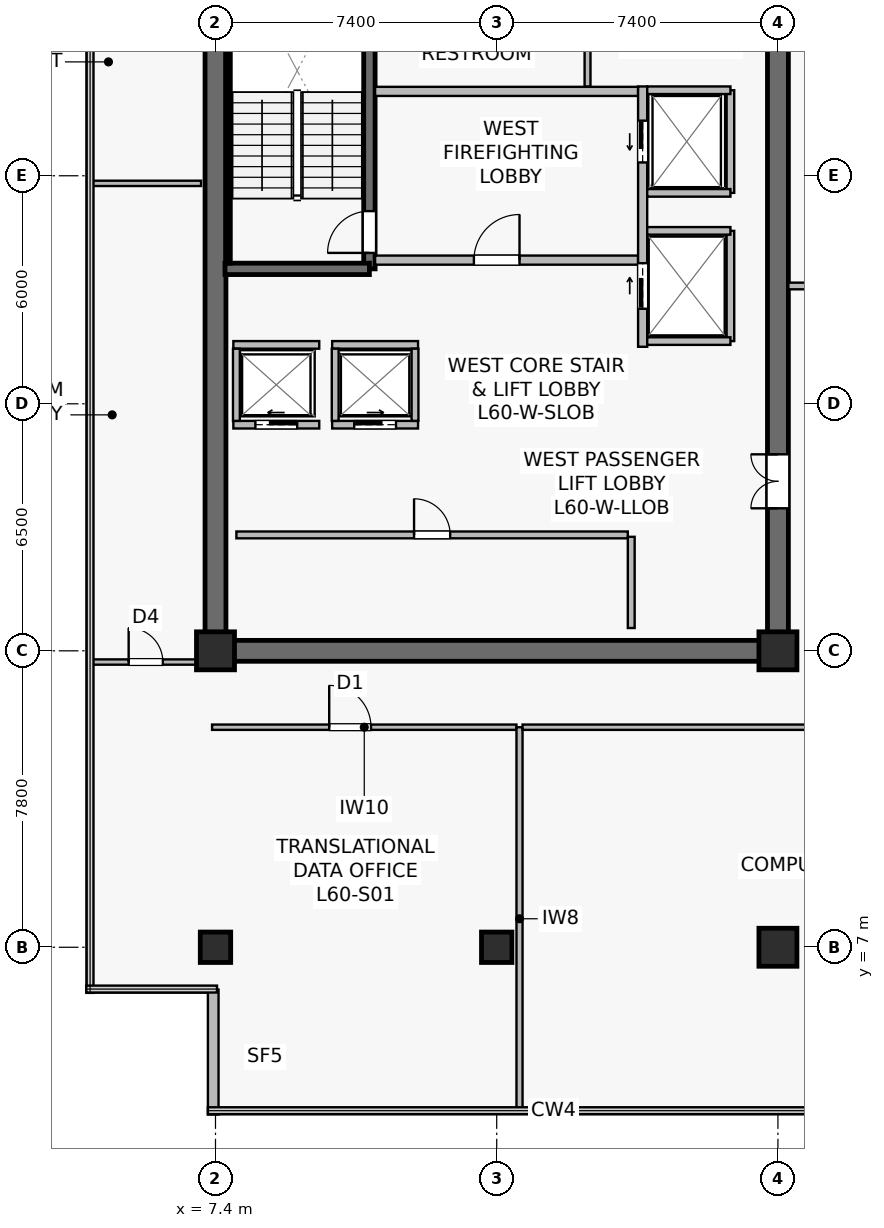
"""IFC4 building model, lengths in metres.
Left out: names, types, materials, properties, quantities, classifications, styles, units other than length and angle.
Written with IfcOpenShell. Run it as: python <this file> out.ifc"""

import sys

from ifc_helpers import new_model, si_unit, direction, frame, frame_2d, origin, origin_2d, place, context, subcontext, project, spatial, rectangle, extrude, source, transform, mapped, element, fill, save


model = new_model("IFC4")
c1 = context("Model", 3, precision=1e-05, world=origin(), true_north=direction((0.0, 1.0)))
c2 = subcontext(c1, "Body", "Model", "MODEL_VIEW")
j1 = project(units=[si_unit("LENGTHUNIT", "METRE"), si_unit("PLANEANGLEUNIT", "RADIAN")], contexts=[c1])
p1 = place(None, origin())
s1 = spatial("IfcSite", under=j1, at=p1, CompositionType="ELEMENT")
p2 = place(p1, origin())
s2 = spatial("IfcBuilding", under=s1, at=p2, CompositionType="ELEMENT")
p3 = place(p2, frame((0.0, 0.0, 250.6)))
s3 = spatial("IfcBuildingStorey", under=s2, at=p3, CompositionType="ELEMENT", Elevation=250.6)
p4 = place(p3, frame((7.125, 14.8, 0.0), z_axis=(0.0, 0.0, 1.0), x_axis=(1.0, 0.0, 0.0)))
e1 = element("IfcWall", 1, at=p4, inside=s3, PredefinedType="SHEAR", context=c2, shape_type="SweptSolid", body=[
    extrude(rectangle(XDim=15.35, YDim=0.55, at=frame_2d((7.675, 0.0))), origin(), (0.0, 0.0, 1.0), 3.8),
])
p5 = place(p3, frame((7.4, 15.075, 0.0), z_axis=(0.0, 0.0, 1.0), x_axis=(0.0, 1.0, 0.0)))
e2 = element("IfcWall", 2, at=p5, inside=s3, PredefinedType="SHEAR", context=c2, shape_type="SweptSolid", body=[
    extrude(rectangle(XDim=18.45, YDim=0.55, at=frame_2d((9.225, 0.0))), origin(), (0.0, 0.0, 1.0), 3.8),
])
p6 = place(p3, frame((22.2, 15.075, 0.0), z_axis=(0.0, 0.0, 1.0), x_axis=(0.0, 1.0, 0.0)))
e3 = element("IfcWall", 3, at=p6, inside=s3, PredefinedType="SHEAR", context=c2, shape_type="SweptSolid", body=[
    extrude(rectangle(XDim=18.45, YDim=0.55, at=frame_2d((9.225, 0.0))), origin(), (0.0, 0.0, 1.0), 3.8),
])
p7 = place(p6, frame((3.475, 0.0, 0.0)))
e4 = element("IfcOpeningElement", 4, at=p7, cuts=e3, PredefinedType="OPENING", context=c2, shape_type="SweptSolid", body=[
    extrude(rectangle(XDim=1.42, YDim=2.2, at=frame_2d((0.71, 1.1))), frame((0.0, 0.285, 0.0), z_axis=(0.0, -1.0, 0.0), x_axis=(1.0, 0.0, 0.0)), (0.0, 0.0, 1.0), 0.57),
])
p8 = place(p3, frame((11.45, 24.85, 0.0), z_axis=(0.0, 0.0, 1.0), x_axis=(0.0, 1.0, 0.0)))
e5 = element("IfcWall", 5, at=p8, inside=s3, PredefinedType="SHEAR", context=c2, shape_type="SweptSolid", body=[
    extrude(rectangle(XDim=8.63, YDim=0.3, at=frame_2d((4.315, 0.0))), origin(), (0.0, 0.0, 1.0), 3.8),
])
p9 = place(p8, frame((0.42, 0.0, 0.0)))
e6 = element("IfcOpeningElement", 6, at=p9, cuts=e5, PredefinedType="OPENING", context=c2, shape_type="SweptSolid", body=[
    extrude(rectangle(XDim=1.1, YDim=2.15, at=frame_2d((0.55, 1.075))), frame((0.0, 0.16, 0.0), z_axis=(0.0, -1.0, 0.0), x_axis=(1.0, 0.0, 0.0)), (0.0, 0.0, 1.0), 0.32),
])
p10 = place(p3, frame((7.65, 24.85, 0.0), z_axis=(0.0, 0.0, 1.0), x_axis=(1.0, 0.0, 0.0)))
e7 = element("IfcWall", 7, at=p10, inside=s3, PredefinedType="SHEAR", context=c2, shape_type="SweptSolid", body=[
    extrude(rectangle(XDim=3.8, YDim=0.3, at=frame_2d((1.9, 0.0))), origin(), (0.0, 0.0, 1.0), 3.8),
])
p11 = place(p3, frame((7.73, 25.0, 0.0), z_axis=(0.0, 0.0, 1.0), x_axis=(0.0, 1.0, 0.0)))
e8 = element("IfcWall", 8, at=p11, inside=s3, PredefinedType="SOLIDWALL", context=c2, shape_type="SweptSolid", body=[
    extrude(rectangle(XDim=8.32, YDim=0.12, at=frame_2d((4.16, 0.0))), origin(), (0.0, 0.0, 1.0), 3.8),
])
m1 = source(origin(), c2, "Body", "SweptSolid", [
    extrude(rectangle(XDim=0.8, YDim=0.8, at=origin_2d()), origin(), (0.0, 0.0, 1.0), 4.1),
])
p12 = place(p3, frame((14.8, 7.0, 0.0), z_axis=(0.0, 0.0, 1.0), x_axis=(1.0, 0.0, 0.0)))
e9 = element("IfcColumn", 9, at=p12, inside=s3, PredefinedType="COLUMN", context=c2, shape_type="MappedRepresentation", body=[
    mapped(m1, transform((0.0, 0.0, 0.0), scale=1.0)),
])
m2 = source(origin(), c2, "Body", "SweptSolid", [
    extrude(rectangle(XDim=1.0, YDim=1.0, at=origin_2d()), origin(), (0.0, 0.0, 1.0), 4.1),
])
for number, where, z_axis, x_axis in (
    (10, (22.2, 7.0, 0.0), (0.0, 0.0, 1.0), (1.0, 0.0, 0.0)),
    (11, (7.4, 14.8, 0.0), (0.0, 0.0, 1.0), (1.0, 0.0, 0.0)),
    (12, (22.2, 14.8, 0.0), (0.0, 0.0, 1.0), (1.0, 0.0, 0.0)),
):
    element("IfcColumn", number, at=place(p3, frame(where, z_axis=z_axis, x_axis=x_axis)), inside=s3, PredefinedType="COLUMN", context=c2, shape_type="MappedRepresentation", body=[
        mapped(m2, transform((0.0, 0.0, 0.0), scale=1.0)),
    ])
p13 = place(p3, frame((7.4, 7.0, 0.0), z_axis=(0.0, 0.0, 1.0), x_axis=(1.0, 0.0, 0.0)))
e13 = element("IfcColumn", 13, at=p13, inside=s3, PredefinedType="COLUMN", context=c2, shape_type="MappedRepresentation", body=[
    mapped(m1, transform((0.0, 0.0, 0.0), scale=1.0)),
])
p14 = place(p3, frame((7.34, 5.888, 0.0), z_axis=(0.0, 0.0, 1.0), x_axis=(0.0, -1.0, 0.0)))
e14 = element("IfcWall", 14, at=p14, inside=s3, PredefinedType="STANDARD", context=c2, shape_type="SweptSolid", body=[
    extrude(rectangle(XDim=3.288, YDim=0.28, at=frame_2d((1.644, 0.0))), origin(), (0.0, 0.0, 1.0), 3.8),
])
p15 = place(p3, frame((11.6, 25.08, 0.0), z_axis=(0.0, 0.0, 1.0), x_axis=(1.0, 0.0, 0.0)))
e15 = element("IfcWall", 15, at=p15, inside=s3, PredefinedType="SOLIDWALL", context=c2, shape_type="SweptSolid", body=[
    extrude(rectangle(XDim=6.92, YDim=0.24, at=frame_2d((3.46, 0.0))), origin(), (0.0, 0.0, 1.0), 3.197),
])
p16 = place(p15, frame((2.6, 0.0, 0.0)))
e16 = element("IfcOpeningElement", 16, at=p16, cuts=e15, PredefinedType="OPENING", context=c2, shape_type="SweptSolid", body=[
    extrude(rectangle(XDim=1.2, YDim=2.16, at=frame_2d((0.6, 1.08))), frame((0.0, 0.13, 0.0), z_axis=(0.0, -1.0, 0.0), x_axis=(1.0, 0.0, 0.0)), (0.0, 0.0, 1.0), 0.26),
])
p17 = place(p3, frame((11.6, 29.52, 0.0), z_axis=(0.0, 0.0, 1.0), x_axis=(1.0, 0.0, 0.0)))
e17 = element("IfcWall", 17, at=p17, inside=s3, PredefinedType="SOLIDWALL", context=c2, shape_type="SweptSolid", body=[
    extrude(rectangle(XDim=6.92, YDim=0.24, at=frame_2d((3.46, 0.0))), origin(), (0.0, 0.0, 1.0), 3.197),
])
p18 = place(p3, frame((18.64, 22.8, 0.0), z_axis=(0.0, 0.0, 1.0), x_axis=(0.0, 1.0, 0.0)))
e18 = element("IfcWall", 18, at=p18, inside=s3, PredefinedType="SOLIDWALL", context=c2, shape_type="SweptSolid", body=[
    extrude(rectangle(XDim=6.85, YDim=0.24, at=frame_2d((3.425, 0.0))), origin(), (0.0, 0.0, 1.0), 2.935),
])
p19 = place(p18, frame((4.85, 0.0, 0.0)))
e19 = element("IfcOpeningElement", 19, at=p19, cuts=e18, PredefinedType="OPENING", context=c2, shape_type="SweptSolid", body=[
    extrude(rectangle(XDim=1.1, YDim=2.22, at=frame_2d((0.55, 1.11))), frame((0.0, 0.13, 0.0), z_axis=(0.0, -1.0, 0.0), x_axis=(1.0, 0.0, 0.0)), (0.0, 0.0, 1.0), 0.26),
])
p20 = place(p18, frame((1.0, 0.0, 0.0)))
e20 = element("IfcOpeningElement", 20, at=p20, cuts=e18, PredefinedType="OPENING", context=c2, shape_type="SweptSolid", body=[
    extrude(rectangle(XDim=1.2, YDim=2.22, at=frame_2d((0.6, 1.11))), frame((0.0, 0.13, 0.0), z_axis=(0.0, -1.0, 0.0), x_axis=(1.0, 0.0, 0.0)), (0.0, 0.0, 1.0), 0.26),
])
p21 = place(p3, frame((7.87, 20.75, 0.0), z_axis=(0.0, 0.0, 1.0), x_axis=(1.0, 0.0, 0.0)))
e21 = element("IfcWall", 21, at=p21, inside=s3, PredefinedType="SOLIDWALL", context=c2, shape_type="SweptSolid", body=[
    extrude(rectangle(XDim=2.26, YDim=0.2, at=frame_2d((1.13, 0.0))), origin(), (0.0, 0.0, 1.0), 3.8),
])
p22 = place(p21, frame((0.58, 0.0, 0.0)))
e22 = element("IfcOpeningElement", 22, at=p22, cuts=e21, PredefinedType="OPENING", context=c2, shape_type="SweptSolid", body=[
    extrude(rectangle(XDim=1.1, YDim=2.22, at=frame_2d((0.55, 1.11))), frame((0.0, 0.11, 0.0), z_axis=(0.0, -1.0, 0.0), x_axis=(1.0, 0.0, 0.0)), (0.0, 0.0, 1.0), 0.22),
])
p23 = place(p3, frame((7.87, 22.85, 0.0), z_axis=(0.0, 0.0, 1.0), x_axis=(1.0, 0.0, 0.0)))
e23 = element("IfcWall", 23, at=p23, inside=s3, PredefinedType="SOLIDWALL", context=c2, shape_type="SweptSolid", body=[
    extrude(rectangle(XDim=2.26, YDim=0.2, at=frame_2d((1.13, 0.0))), origin(), (0.0, 0.0, 1.0), 3.8),
])
p24 = place(p3, frame((7.95, 20.85, 0.0), z_axis=(0.0, 0.0, 1.0), x_axis=(0.0, 1.0, 0.0)))
e24 = element("IfcWall", 24, at=p24, inside=s3, PredefinedType="SOLIDWALL", context=c2, shape_type="SweptSolid", body=[
    extrude(rectangle(XDim=1.9, YDim=0.18, at=frame_2d((0.95, 0.0))), origin(), (0.0, 0.0, 1.0), 3.8),
])
p25 = place(p3, frame((10.47, 20.75, 0.0), z_axis=(0.0, 0.0, 1.0), x_axis=(1.0, 0.0, 0.0)))
e25 = element("IfcWall", 25, at=p25, inside=s3, PredefinedType="SOLIDWALL", context=c2, shape_type="SweptSolid", body=[
    extrude(rectangle(XDim=2.26, YDim=0.2, at=frame_2d((1.13, 0.0))), origin(), (0.0, 0.0, 1.0), 3.8),
])
p26 = place(p25, frame((0.58, 0.0, 0.0)))
e26 = element("IfcOpeningElement", 26, at=p26, cuts=e25, PredefinedType="OPENING", context=c2, shape_type="SweptSolid", body=[
    extrude(rectangle(XDim=1.1, YDim=2.22, at=frame_2d((0.55, 1.11))), frame((0.0, 0.11, 0.0), z_axis=(0.0, -1.0, 0.0), x_axis=(1.0, 0.0, 0.0)), (0.0, 0.0, 1.0), 0.22),
])
p27 = place(p3, frame((10.47, 22.85, 0.0), z_axis=(0.0, 0.0, 1.0), x_axis=(1.0, 0.0, 0.0)))
e27 = element("IfcWall", 27, at=p27, inside=s3, PredefinedType="SOLIDWALL", context=c2, shape_type="SweptSolid", body=[
    extrude(rectangle(XDim=2.26, YDim=0.2, at=frame_2d((1.13, 0.0))), origin(), (0.0, 0.0, 1.0), 3.8),
])
for number, where, z_axis, x_axis in (
    (28, (10.55, 20.85, 0.0), (0.0, 0.0, 1.0), (0.0, 1.0, 0.0)),
    (29, (12.65, 20.85, 0.0), (0.0, 0.0, 1.0), (0.0, 1.0, 0.0)),
):
    element("IfcWall", number, at=place(p3, frame(where, z_axis=z_axis, x_axis=x_axis)), inside=s3, PredefinedType="SOLIDWALL", context=c2, shape_type="SweptSolid", body=[
        extrude(rectangle(XDim=1.9, YDim=0.18, at=frame_2d((0.95, 0.0))), origin(), (0.0, 0.0, 1.0), 3.8),
    ])
p28 = place(p3, frame((20.95, 26.85, 0.0), z_axis=(0.0, 0.0, 1.0), x_axis=(0.0, 1.0, 0.0)))
e30 = element("IfcWall", 30, at=p28, inside=s3, PredefinedType="SOLIDWALL", context=c2, shape_type="SweptSolid", body=[
    extrude(rectangle(XDim=2.7, YDim=0.2, at=frame_2d((1.35, 0.0))), origin(), (0.0, 0.0, 1.0), 3.8),
])
p29 = place(p3, frame((18.76, 29.55, 0.0), z_axis=(0.0, 0.0, 1.0), x_axis=(1.0, 0.0, 0.0)))
e31 = element("IfcWall", 31, at=p29, inside=s3, PredefinedType="SOLIDWALL", context=c2, shape_type="SweptSolid", body=[
    extrude(rectangle(XDim=2.19, YDim=0.2, at=frame_2d((1.095, 0.0))), origin(), (0.0, 0.0, 1.0), 3.8),
])
p30 = place(p3, frame((18.76, 26.85, 0.0), z_axis=(0.0, 0.0, 1.0), x_axis=(1.0, 0.0, 0.0)))
e32 = element("IfcWall", 32, at=p30, inside=s3, PredefinedType="SOLIDWALL", context=c2, shape_type="SweptSolid", body=[
    extrude(rectangle(XDim=2.19, YDim=0.2, at=frame_2d((1.095, 0.0))), origin(), (0.0, 0.0, 1.0), 3.197),
])
p31 = place(p3, frame((20.95, 22.95, 0.0), z_axis=(0.0, 0.0, 1.0), x_axis=(0.0, 1.0, 0.0)))
e33 = element("IfcWall", 33, at=p31, inside=s3, PredefinedType="SOLIDWALL", context=c2, shape_type="SweptSolid", body=[
    extrude(rectangle(XDim=2.9, YDim=0.2, at=frame_2d((1.45, 0.0))), origin(), (0.0, 0.0, 1.0), 2.935),
])
for number, where, z_axis, x_axis in (
    (34, (18.76, 25.85, 0.0), (0.0, 0.0, 1.0), (1.0, 0.0, 0.0)),
    (35, (18.76, 22.95, 0.0), (0.0, 0.0, 1.0), (1.0, 0.0, 0.0)),
):
    element("IfcWall", number, at=place(p3, frame(where, z_axis=z_axis, x_axis=x_axis)), inside=s3, PredefinedType="SOLIDWALL", context=c2, shape_type="SweptSolid", body=[
        extrude(rectangle(XDim=2.19, YDim=0.2, at=frame_2d((1.095, 0.0))), origin(), (0.0, 0.0, 1.0), 3.8),
    ])
p32 = place(p3, frame((7.95, 17.85, 0.0), z_axis=(0.0, 0.0, 1.0), x_axis=(1.0, 0.0, 0.0)))
e36 = element("IfcWall", 36, at=p32, inside=s3, PredefinedType="SOLIDWALL", context=c2, shape_type="SweptSolid", body=[
    extrude(rectangle(XDim=10.3, YDim=0.18, at=frame_2d((5.15, 0.0))), origin(), (0.0, 0.0, 1.0), 3.197),
])
p33 = place(p32, frame((4.675, 0.0, 0.0)))
e37 = element("IfcOpeningElement", 37, at=p33, cuts=e36, PredefinedType="OPENING", context=c2, shape_type="SweptSolid", body=[
    extrude(rectangle(XDim=0.95, YDim=2.15, at=frame_2d((0.475, 1.075))), frame((0.0, 0.1, 0.0), z_axis=(0.0, -1.0, 0.0), x_axis=(1.0, 0.0, 0.0)), (0.0, 0.0, 1.0), 0.2),
])
p34 = place(p3, frame((18.34, 15.4, 0.0), z_axis=(0.0, 0.0, 1.0), x_axis=(0.0, 1.0, 0.0)))
e38 = element("IfcWall", 38, at=p34, inside=s3, PredefinedType="SOLIDWALL", context=c2, shape_type="SweptSolid", body=[
    extrude(rectangle(XDim=2.4, YDim=0.18, at=frame_2d((1.2, 0.0))), origin(), (0.0, 0.0, 1.0), 3.8),
])
p35 = place(p3, frame((17.19, 29.65, 0.0), z_axis=(0.0, 0.0, 1.0), x_axis=(0.0, 1.0, 0.0)))
e39 = element("IfcWall", 39, at=p35, inside=s3, PredefinedType="PLUMBINGWALL", context=c2, shape_type="SweptSolid", body=[
    extrude(rectangle(XDim=3.93, YDim=0.155, at=frame_2d((1.965, 0.0))), origin(), (0.0, 0.0, 1.0), 3.8),
])
p36 = place(p3, frame((22.475, 24.4, 0.0), z_axis=(0.0, 0.0, 1.0), x_axis=(1.0, 0.0, 0.0)))
e40 = element("IfcWall", 40, at=p36, inside=s3, PredefinedType="PARTITIONING", context=c2, shape_type="SweptSolid", body=[
    extrude(rectangle(XDim=4.025, YDim=0.175, at=frame_2d((2.012, 0.0))), origin(), (0.0, 0.0, 1.0), 3.8),
])
p37 = place(p36, frame((1.35, 0.0, 0.0)))
e41 = element("IfcOpeningElement", 41, at=p37, cuts=e40, PredefinedType="OPENING", context=c2, shape_type="SweptSolid", body=[
    extrude(rectangle(XDim=0.95, YDim=2.15, at=frame_2d((0.475, 1.075))), frame((0.0, 0.098, 0.0), z_axis=(0.0, -1.0, 0.0), x_axis=(1.0, 0.0, 0.0)), (0.0, 0.0, 1.0), 0.195),
])
p38 = place(p3, frame((7.31, 12.79, 0.0), z_axis=(0.0, 0.0, 1.0), x_axis=(1.0, 0.0, 0.0)))
e42 = element("IfcWall", 42, at=p38, inside=s3, PredefinedType="PARTITIONING", context=c2, shape_type="SweptSolid", body=[
    extrude(rectangle(XDim=8.01, YDim=0.14, at=frame_2d((4.005, 0.0))), origin(), (0.0, 0.0, 1.0), 3.197),
])
p39 = place(p38, frame((3.083, 0.0, 0.0)))
e43 = element("IfcOpeningElement", 43, at=p39, cuts=e42, PredefinedType="OPENING", context=c2, shape_type="SweptSolid", body=[
    extrude(rectangle(XDim=1.1, YDim=2.18, at=frame_2d((0.55, 1.09))), frame((0.0, 0.08, 0.0), z_axis=(0.0, -1.0, 0.0), x_axis=(1.0, 0.0, 0.0)), (0.0, 0.0, 1.0), 0.16),
])
p40 = place(p3, frame((15.4, 2.71, 0.0), z_axis=(0.0, 0.0, 1.0), x_axis=(0.0, 1.0, 0.0)))
e44 = element("IfcWall", 44, at=p40, inside=s3, PredefinedType="PARTITIONING", context=c2, shape_type="SweptSolid", body=[
    extrude(rectangle(XDim=10.08, YDim=0.16, at=frame_2d((5.04, 0.0))), origin(), (0.0, 0.0, 1.0), 3.135),
])
p41 = place(p3, frame((15.48, 12.79, 0.0), z_axis=(0.0, 0.0, 1.0), x_axis=(1.0, 0.0, 0.0)))
e45 = element("IfcWall", 45, at=p41, inside=s3, PredefinedType="PARTITIONING", context=c2, shape_type="SweptSolid", body=[
    extrude(rectangle(XDim=15.24, YDim=0.14, at=frame_2d((7.62, 0.0))), origin(), (0.0, 0.0, 1.0), 3.197),
])
p42 = place(p41, frame((7.876, 0.0, 0.0)))
e46 = element("IfcOpeningElement", 46, at=p42, cuts=e45, PredefinedType="OPENING", context=c2, shape_type="SweptSolid", body=[
    extrude(rectangle(XDim=1.1, YDim=2.18, at=frame_2d((0.55, 1.09))), frame((0.0, 0.08, 0.0), z_axis=(0.0, -1.0, 0.0), x_axis=(1.0, 0.0, 0.0)), (0.0, 0.0, 1.0), 0.16),
])
p43 = place(p3, frame((4.11, 27.1, 0.0), z_axis=(0.0, 0.0, 1.0), x_axis=(1.0, 0.0, 0.0)))
e47 = element("IfcWall", 47, at=p43, inside=s3, PredefinedType="PARTITIONING", context=c2, shape_type="SweptSolid", body=[
    extrude(rectangle(XDim=2.91, YDim=0.14, at=frame_2d((1.455, 0.0))), origin(), (0.0, 0.0, 1.0), 3.8),
])
p44 = place(p3, frame((4.11, 14.505, 0.0), z_axis=(0.0, 0.0, 1.0), x_axis=(1.0, 0.0, 0.0)))
e48 = element("IfcWall", 48, at=p44, inside=s3, PredefinedType="PARTITIONING", context=c2, shape_type="SweptSolid", body=[
    extrude(rectangle(XDim=2.91, YDim=0.14, at=frame_2d((1.455, 0.0))), origin(), (0.0, 0.0, 1.0), 3.8),
])
p45 = place(p44, frame((1.005, 0.0, 0.0)))
e49 = element("IfcOpeningElement", 49, at=p45, cuts=e48, PredefinedType="OPENING", context=c2, shape_type="SweptSolid", body=[
    extrude(rectangle(XDim=0.9, YDim=2.1, at=frame_2d((0.45, 1.05))), frame((0.0, 0.08, 0.0), z_axis=(0.0, -1.0, 0.0), x_axis=(1.0, 0.0, 0.0)), (0.0, 0.0, 1.0), 0.16),
])
m3 = source(origin(), c2, "Body", "SweptSolid", [
    extrude(rectangle(XDim=1.1, YDim=2.15, at=frame_2d((0.55, 1.075))), frame((0.0, 0.025, 0.0), z_axis=(0.0, -1.0, 0.0), x_axis=(1.0, 0.0, 0.0)), (0.0, 0.0, 1.0), 0.05),
])
p46 = place(p9, origin())
e50 = element("IfcDoor", 50, at=p46, inside=s3, OperationType="SINGLE_SWING_LEFT", PredefinedType="DOOR", context=c2, shape_type="MappedRepresentation", body=[
    mapped(m3, transform((0.0, 0.0, 0.0), scale=1.0)),
])
fill(e6, e50)
m4 = source(origin(), c2, "Body", "SweptSolid", [
    extrude(rectangle(XDim=1.2, YDim=2.16, at=frame_2d((0.6, 1.08))), frame((0.0, 0.025, 0.0), z_axis=(0.0, -1.0, 0.0), x_axis=(1.0, 0.0, 0.0)), (0.0, 0.0, 1.0), 0.05),
])
p47 = place(p16, origin())
e51 = element("IfcDoor", 51, at=p47, inside=s3, OperationType="SINGLE_SWING_RIGHT", PredefinedType="DOOR", context=c2, shape_type="MappedRepresentation", body=[
    mapped(m4, transform((0.0, 0.0, 0.0), scale=1.0)),
])
fill(e16, e51)
m5 = source(origin(), c2, "Body", "SweptSolid", [
    extrude(rectangle(XDim=1.1, YDim=2.22, at=frame_2d((0.55, 1.11))), frame((0.0, 0.025, 0.0), z_axis=(0.0, -1.0, 0.0), x_axis=(1.0, 0.0, 0.0)), (0.0, 0.0, 1.0), 0.05),
])
p48 = place(p22, origin())
e52 = element("IfcDoor", 52, at=p48, inside=s3, OperationType="SLIDING_TO_LEFT", PredefinedType="USERDEFINED", context=c2, shape_type="MappedRepresentation", body=[
    mapped(m5, transform((0.0, 0.0, 0.0), scale=1.0)),
])
fill(e22, e52)
p49 = place(p26, origin())
e53 = element("IfcDoor", 53, at=p49, inside=s3, OperationType="SLIDING_TO_RIGHT", PredefinedType="USERDEFINED", context=c2, shape_type="MappedRepresentation", body=[
    mapped(m5, transform((0.0, 0.0, 0.0), scale=1.0)),
])
fill(e26, e53)
p50 = place(p19, origin())
e54 = element("IfcDoor", 54, at=p50, inside=s3, OperationType="SLIDING_TO_LEFT", PredefinedType="USERDEFINED", context=c2, shape_type="MappedRepresentation", body=[
    mapped(m5, transform((0.0, 0.0, 0.0), scale=1.0)),
])
fill(e19, e54)
m6 = source(origin(), c2, "Body", "SweptSolid", [
    extrude(rectangle(XDim=1.2, YDim=2.22, at=frame_2d((0.6, 1.11))), frame((0.0, 0.025, 0.0), z_axis=(0.0, -1.0, 0.0), x_axis=(1.0, 0.0, 0.0)), (0.0, 0.0, 1.0), 0.05),
])
p51 = place(p20, origin())
e55 = element("IfcDoor", 55, at=p51, inside=s3, OperationType="SLIDING_TO_RIGHT", PredefinedType="USERDEFINED", context=c2, shape_type="MappedRepresentation", body=[
    mapped(m6, transform((0.0, 0.0, 0.0), scale=1.0)),
])
fill(e20, e55)
m7 = source(origin(), c2, "Body", "SweptSolid", [
    extrude(rectangle(XDim=0.95, YDim=2.15, at=frame_2d((0.475, 1.075))), frame((0.0, 0.025, 0.0), z_axis=(0.0, -1.0, 0.0), x_axis=(1.0, 0.0, 0.0)), (0.0, 0.0, 1.0), 0.05),
])
p52 = place(p33, origin())
e56 = element("IfcDoor", 56, at=p52, inside=s3, OperationType="SINGLE_SWING_LEFT", PredefinedType="DOOR", context=c2, shape_type="MappedRepresentation", body=[
    mapped(m7, transform((0.0, 0.0, 0.0), scale=1.0)),
])
fill(e37, e56)
m8 = source(origin(), c2, "Body", "SweptSolid", [
    extrude(rectangle(XDim=1.42, YDim=2.2, at=frame_2d((0.71, 1.1))), frame((0.0, 0.025, 0.0), z_axis=(0.0, -1.0, 0.0), x_axis=(1.0, 0.0, 0.0)), (0.0, 0.0, 1.0), 0.05),
])
p53 = place(p7, origin())
e57 = element("IfcDoor", 57, at=p53, inside=s3, OperationType="DOUBLE_DOOR_SINGLE_SWING", PredefinedType="DOOR", context=c2, shape_type="MappedRepresentation", body=[
    mapped(m8, transform((0.0, 0.0, 0.0), scale=1.0)),
])
fill(e4, e57)
m9 = source(origin(), c2, "Body", "SweptSolid", [
    extrude(rectangle(XDim=1.1, YDim=2.18, at=frame_2d((0.55, 1.09))), frame((0.0, 0.025, 0.0), z_axis=(0.0, -1.0, 0.0), x_axis=(1.0, 0.0, 0.0)), (0.0, 0.0, 1.0), 0.05),
])
p54 = place(p39, origin())
e58 = element("IfcDoor", 58, at=p54, inside=s3, OperationType="SINGLE_SWING_LEFT", PredefinedType="DOOR", context=c2, shape_type="MappedRepresentation", body=[
    mapped(m9, transform((0.0, 0.0, 0.0), scale=1.0)),
])
fill(e43, e58)
m10 = source(origin(), c2, "Body", "SweptSolid", [
    extrude(rectangle(XDim=0.9, YDim=2.1, at=frame_2d((0.45, 1.05))), frame((0.0, 0.025, 0.0), z_axis=(0.0, -1.0, 0.0), x_axis=(1.0, 0.0, 0.0)), (0.0, 0.0, 1.0), 0.05),
])
p55 = place(p45, origin())
e59 = element("IfcDoor", 59, at=p55, inside=s3, OperationType="SINGLE_SWING_LEFT", PredefinedType="DOOR", context=c2, shape_type="MappedRepresentation", body=[
    mapped(m10, transform((0.0, 0.0, 0.0), scale=1.0)),
])
fill(e49, e59)
save(model, sys.argv[1])
